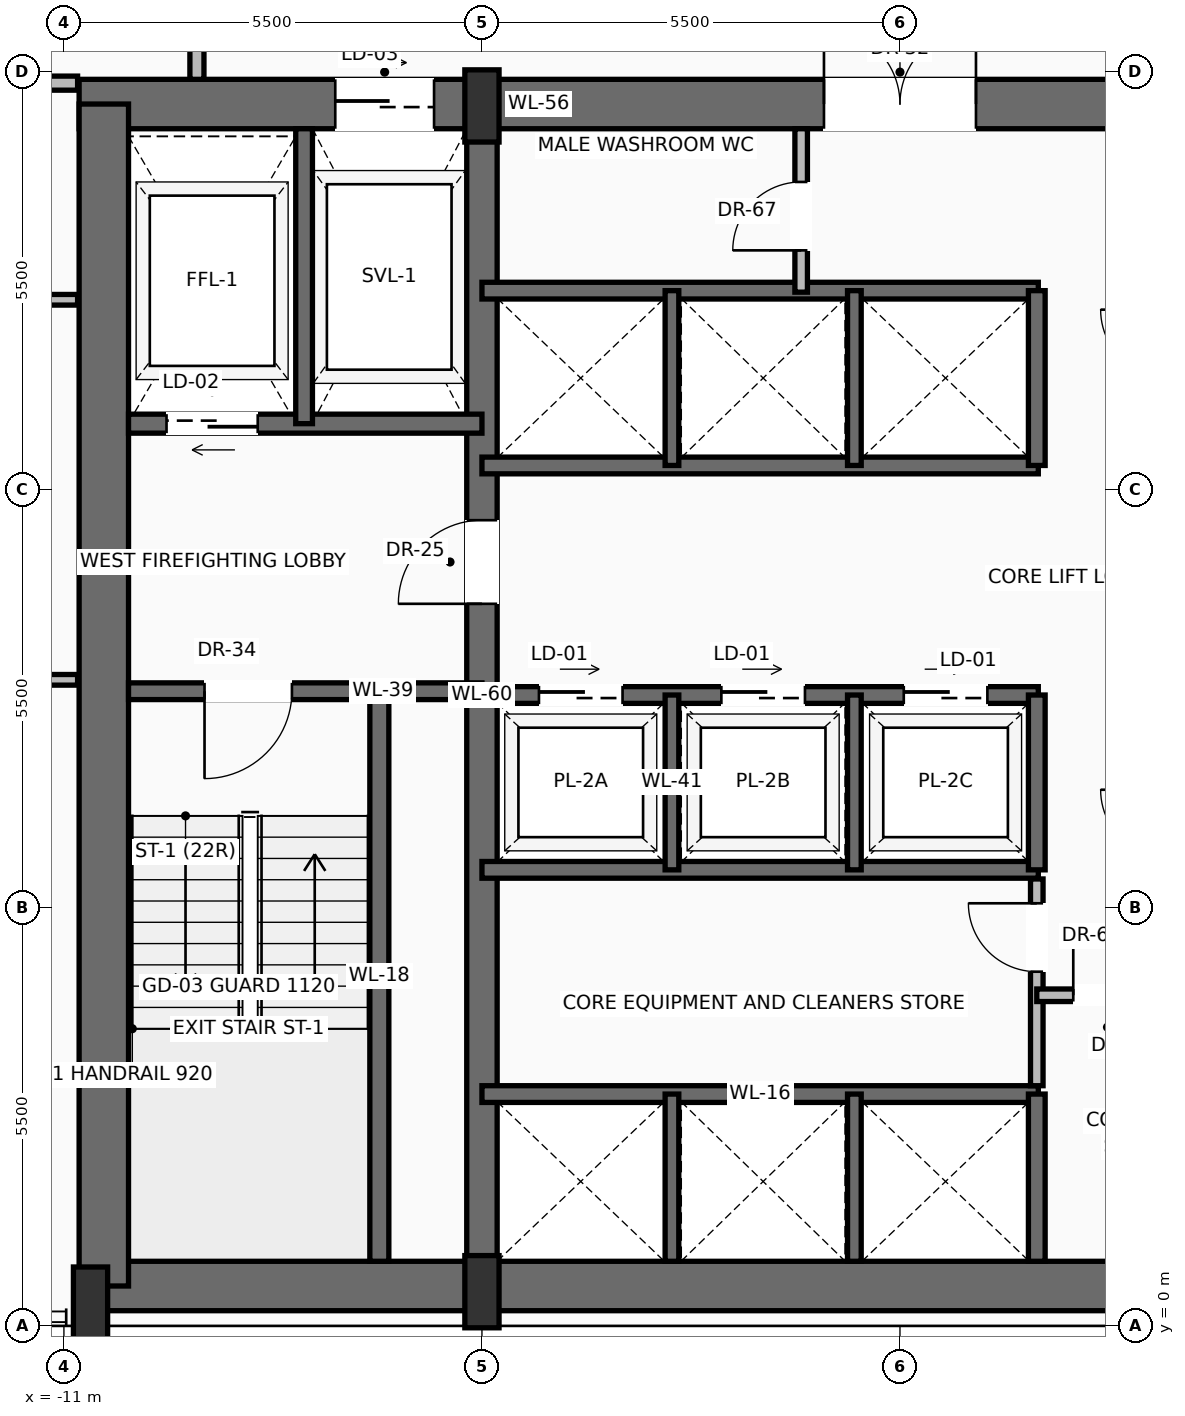
"""IFC4 building model, lengths in metres.
Left out: names, types, materials, properties, quantities, classifications, styles, units other than length and angle.
Written with IfcOpenShell. Run it as: python <this file> out.ifc"""

import sys

from ifc_helpers import new_model, si_unit, direction, frame, frame_2d, origin, origin_2d, place, context, subcontext, project, spatial, rectangle, extrude, source, transform, mapped, element, fill, save


model = new_model("IFC4")
c1 = context("Model", 3, precision=1e-05, world=origin(), true_north=direction((0.0, 1.0)))
c2 = subcontext(c1, "Body", "Model", "MODEL_VIEW")
j1 = project(units=[si_unit("LENGTHUNIT", "METRE"), si_unit("PLANEANGLEUNIT", "RADIAN")], contexts=[c1])
p1 = place(None, origin())
s1 = spatial("IfcSite", under=j1, at=p1, CompositionType="ELEMENT")
p2 = place(p1, origin())
s2 = spatial("IfcBuilding", under=s1, at=p2, CompositionType="ELEMENT")
p3 = place(p2, frame((0.0, 0.0, 125.6)))
s3 = spatial("IfcBuildingStorey", under=s2, at=p3, CompositionType="ELEMENT", Elevation=125.6)
p4 = place(p3, frame((-10.65, 0.525, 0.0), z_axis=(0.0, 0.0, 1.0), x_axis=(1.0, 0.0, 0.0)))
e1 = element("IfcWall", 1, at=p4, inside=s3, PredefinedType="SHEAR", context=c2, shape_type="SweptSolid", body=[
    extrude(rectangle(XDim=21.3, YDim=0.65, at=frame_2d((10.65, 0.0))), origin(), (0.0, 0.0, 1.0), 3.47),
])
p5 = place(p3, frame((-10.8, 16.075, 0.0), z_axis=(0.0, 0.0, 1.0), x_axis=(1.0, 0.0, 0.0)))
e2 = element("IfcWall", 2, at=p5, inside=s3, PredefinedType="SHEAR", context=c2, shape_type="SweptSolid", body=[
    extrude(rectangle(XDim=21.6, YDim=0.65, at=frame_2d((10.8, 0.0))), origin(), (0.0, 0.0, 1.0), 3.47),
])
p6 = place(p5, frame((3.37, 0.0, 0.0)))
e3 = element("IfcOpeningElement", 3, at=p6, cuts=e2, PredefinedType="OPENING", context=c2, shape_type="SweptSolid", body=[
    extrude(rectangle(XDim=1.3, YDim=2.3, at=frame_2d((0.65, 1.15))), frame((0.0, 0.335, 0.0), z_axis=(0.0, -1.0, 0.0), x_axis=(1.0, 0.0, 0.0)), (0.0, 0.0, 1.0), 0.67),
])
p7 = place(p5, frame((9.8, 0.0, 0.0)))
e4 = element("IfcOpeningElement", 4, at=p7, cuts=e2, PredefinedType="OPENING", context=c2, shape_type="SweptSolid", body=[
    extrude(rectangle(XDim=2.0, YDim=2.4, at=frame_2d((1.0, 1.2))), frame((0.0, 0.335, 0.0), z_axis=(0.0, -1.0, 0.0), x_axis=(1.0, 0.0, 0.0)), (0.0, 0.0, 1.0), 0.67),
])
p8 = place(p3, frame((-10.475, 0.525, 0.0), z_axis=(0.0, 0.0, 1.0), x_axis=(0.0, 1.0, 0.0)))
e5 = element("IfcWall", 5, at=p8, inside=s3, PredefinedType="SHEAR", context=c2, shape_type="SweptSolid", body=[
    extrude(rectangle(XDim=15.55, YDim=0.65, at=frame_2d((7.775, 0.0))), origin(), (0.0, 0.0, 1.0), 3.47),
])
p9 = place(p3, frame((-5.5, 0.525, 0.0), z_axis=(0.0, 0.0, 1.0), x_axis=(0.0, 1.0, 0.0)))
e6 = element("IfcWall", 6, at=p9, inside=s3, PredefinedType="SHEAR", context=c2, shape_type="SweptSolid", body=[
    extrude(rectangle(XDim=15.55, YDim=0.4, at=frame_2d((7.775, 0.0))), origin(), (0.0, 0.0, 1.0), 3.47),
])
p10 = place(p9, frame((8.975, 0.0, 0.0)))
e7 = element("IfcOpeningElement", 7, at=p10, cuts=e6, PredefinedType="OPENING", context=c2, shape_type="SweptSolid", body=[
    extrude(rectangle(XDim=1.1, YDim=2.2, at=frame_2d((0.55, 1.1))), frame((0.0, 0.21, 0.0), z_axis=(0.0, -1.0, 0.0), x_axis=(1.0, 0.0, 0.0)), (0.0, 0.0, 1.0), 0.42),
])
m1 = source(origin(), c2, "Body", "SweptSolid", [
    extrude(rectangle(XDim=0.45, YDim=0.95, at=origin_2d()), origin(), (0.0, 0.0, 1.0), 3.7),
])
for number, where, z_axis, x_axis in (
    (8, (-10.65, 0.3, 0.0), (0.0, 0.0, 1.0), (1.0, 0.0, 0.0)),
    (9, (-5.5, 0.45, 0.0), (0.0, 0.0, 1.0), (1.0, 0.0, 0.0)),
    (10, (-5.5, 16.05, 0.0), (0.0, 0.0, 1.0), (1.0, 0.0, 0.0)),
):
    element("IfcColumn", number, at=place(p3, frame(where, z_axis=z_axis, x_axis=x_axis)), inside=s3, PredefinedType="PILASTER", context=c2, shape_type="MappedRepresentation", body=[
        mapped(m1, transform((0.0, 0.0, 0.0), scale=1.0)),
    ])
p11 = place(p3, frame((-6.85, 0.85, 0.0), z_axis=(0.0, 0.0, 1.0), x_axis=(0.0, 1.0, 0.0)))
e11 = element("IfcWall", 11, at=p11, inside=s3, PredefinedType="SOLIDWALL", context=c2, shape_type="SweptSolid", body=[
    extrude(rectangle(XDim=7.5, YDim=0.25, at=frame_2d((3.75, 0.0))), origin(), (0.0, 0.0, 1.0), 3.47),
])
p12 = place(p3, frame((-5.5, 8.35, 0.0), z_axis=(0.0, 0.0, 1.0), x_axis=(-1.0, 0.0, 0.0)))
e12 = element("IfcWall", 12, at=p12, inside=s3, PredefinedType="SOLIDWALL", context=c2, shape_type="SweptSolid", body=[
    extrude(rectangle(XDim=4.65, YDim=0.22, at=frame_2d((2.325, 0.0))), origin(), (0.0, 0.0, 1.0), 3.47),
])
p13 = place(p12, frame((2.5, 0.0, 0.0)))
e13 = element("IfcOpeningElement", 13, at=p13, cuts=e12, PredefinedType="OPENING", context=c2, shape_type="SweptSolid", body=[
    extrude(rectangle(XDim=1.15, YDim=2.2, at=frame_2d((0.575, 1.1))), frame((0.0, 0.12, 0.0), z_axis=(0.0, -1.0, 0.0), x_axis=(1.0, 0.0, 0.0)), (0.0, 0.0, 1.0), 0.24),
])
p14 = place(p3, frame((-5.5, 11.87, 0.0), z_axis=(0.0, 0.0, 1.0), x_axis=(-1.0, 0.0, 0.0)))
e14 = element("IfcWall", 14, at=p14, inside=s3, PredefinedType="SOLIDWALL", context=c2, shape_type="SweptSolid", body=[
    extrude(rectangle(XDim=4.65, YDim=0.25, at=frame_2d((2.325, 0.0))), origin(), (0.0, 0.0, 1.0), 3.47),
])
p15 = place(p14, frame((2.95, 0.0, 0.0)))
e15 = element("IfcOpeningElement", 15, at=p15, cuts=e14, PredefinedType="OPENING", context=c2, shape_type="SweptSolid", body=[
    extrude(rectangle(XDim=1.2, YDim=2.25, at=frame_2d((0.6, 1.125))), frame((0.0, 0.135, 0.0), z_axis=(0.0, -1.0, 0.0), x_axis=(1.0, 0.0, 0.0)), (0.0, 0.0, 1.0), 0.27),
])
p16 = place(p3, frame((-7.84, 11.87, 0.0), z_axis=(0.0, 0.0, 1.0), x_axis=(0.0, 1.0, 0.0)))
e16 = element("IfcWall", 16, at=p16, inside=s3, PredefinedType="SOLIDWALL", context=c2, shape_type="SweptSolid", body=[
    extrude(rectangle(XDim=3.88, YDim=0.22, at=frame_2d((1.94, 0.0))), origin(), (0.0, 0.0, 1.0), 3.47),
])
p17 = place(p3, frame((-5.5, 3.05, 0.0), z_axis=(0.0, 0.0, 1.0), x_axis=(1.0, 0.0, 0.0)))
e17 = element("IfcWall", 17, at=p17, inside=s3, PredefinedType="SOLIDWALL", context=c2, shape_type="SweptSolid", body=[
    extrude(rectangle(XDim=7.32, YDim=0.22, at=frame_2d((3.66, 0.0))), origin(), (0.0, 0.0, 1.0), 3.47),
])
p18 = place(p3, frame((1.8, 0.85, 0.0), z_axis=(0.0, 0.0, 1.0), x_axis=(0.0, 1.0, 0.0)))
e18 = element("IfcWall", 18, at=p18, inside=s3, PredefinedType="SOLIDWALL", context=c2, shape_type="SweptSolid", body=[
    extrude(rectangle(XDim=2.2, YDim=0.22, at=frame_2d((1.1, 0.0))), origin(), (0.0, 0.0, 1.0), 3.47),
])
for number, where, z_axis, x_axis in (
    (19, (-3.0, 0.85, 0.0), (0.0, 0.0, 1.0), (0.0, 1.0, 0.0)),
    (20, (-0.6, 0.85, 0.0), (0.0, 0.0, 1.0), (0.0, 1.0, 0.0)),
):
    element("IfcWall", number, at=place(p3, frame(where, z_axis=z_axis, x_axis=x_axis)), inside=s3, PredefinedType="SOLIDWALL", context=c2, shape_type="SweptSolid", body=[
        extrude(rectangle(XDim=2.2, YDim=0.18, at=frame_2d((1.1, 0.0))), origin(), (0.0, 0.0, 1.0), 3.47),
    ])
p19 = place(p3, frame((1.8, 3.16, 0.0), z_axis=(0.0, 0.0, 1.0), x_axis=(0.0, 1.0, 0.0)))
e21 = element("IfcWall", 21, at=p19, inside=s3, PredefinedType="PARTITIONING", context=c2, shape_type="SweptSolid", body=[
    extrude(rectangle(XDim=2.72, YDim=0.165, at=frame_2d((1.36, 0.0))), origin(), (0.0, 0.0, 1.0), 3.462),
])
p20 = place(p19, frame((1.5, 0.0, 0.0)))
e22 = element("IfcOpeningElement", 22, at=p20, cuts=e21, PredefinedType="OPENING", context=c2, shape_type="SweptSolid", body=[
    extrude(rectangle(XDim=0.9, YDim=2.1, at=frame_2d((0.45, 1.05))), frame((0.0, 0.093, 0.0), z_axis=(0.0, -1.0, 0.0), x_axis=(1.0, 0.0, 0.0)), (0.0, 0.0, 1.0), 0.185),
])
p21 = place(p3, frame((1.8, 4.35, 0.0), z_axis=(0.0, 0.0, 1.0), x_axis=(1.0, 0.0, 0.0)))
e23 = element("IfcWall", 23, at=p21, inside=s3, PredefinedType="PARTITIONING", context=c2, shape_type="SweptSolid", body=[
    extrude(rectangle(XDim=3.62, YDim=0.165, at=frame_2d((1.81, 0.0))), origin(), (0.0, 0.0, 1.0), 3.462),
])
p22 = place(p21, frame((0.48, 0.0, 0.0)))
e24 = element("IfcOpeningElement", 24, at=p22, cuts=e23, PredefinedType="OPENING", context=c2, shape_type="SweptSolid", body=[
    extrude(rectangle(XDim=0.9, YDim=2.1, at=frame_2d((0.45, 1.05))), frame((0.0, 0.093, 0.0), z_axis=(0.0, -1.0, 0.0), x_axis=(1.0, 0.0, 0.0)), (0.0, 0.0, 1.0), 0.185),
])
p23 = place(p3, frame((-5.5, 6.0, 0.0), z_axis=(0.0, 0.0, 1.0), x_axis=(1.0, 0.0, 0.0)))
e25 = element("IfcWall", 25, at=p23, inside=s3, PredefinedType="SOLIDWALL", context=c2, shape_type="SweptSolid", body=[
    extrude(rectangle(XDim=7.32, YDim=0.22, at=frame_2d((3.66, 0.0))), origin(), (0.0, 0.0, 1.0), 3.47),
])
p24 = place(p3, frame((-5.5, 8.3, 0.0), z_axis=(0.0, 0.0, 1.0), x_axis=(1.0, 0.0, 0.0)))
e26 = element("IfcWall", 26, at=p24, inside=s3, PredefinedType="SOLIDWALL", context=c2, shape_type="SweptSolid", body=[
    extrude(rectangle(XDim=7.32, YDim=0.22, at=frame_2d((3.66, 0.0))), origin(), (0.0, 0.0, 1.0), 3.47),
])
p25 = place(p24, frame((0.75, 0.0, 0.0)))
e27 = element("IfcOpeningElement", 27, at=p25, cuts=e26, PredefinedType="OPENING", context=c2, shape_type="SweptSolid", body=[
    extrude(rectangle(XDim=1.1, YDim=2.2, at=frame_2d((0.55, 1.1))), frame((0.0, 0.12, 0.0), z_axis=(0.0, -1.0, 0.0), x_axis=(1.0, 0.0, 0.0)), (0.0, 0.0, 1.0), 0.24),
])
p26 = place(p24, frame((3.15, 0.0, 0.0)))
e28 = element("IfcOpeningElement", 28, at=p26, cuts=e26, PredefinedType="OPENING", context=c2, shape_type="SweptSolid", body=[
    extrude(rectangle(XDim=1.1, YDim=2.2, at=frame_2d((0.55, 1.1))), frame((0.0, 0.12, 0.0), z_axis=(0.0, -1.0, 0.0), x_axis=(1.0, 0.0, 0.0)), (0.0, 0.0, 1.0), 0.24),
])
p27 = place(p24, frame((5.55, 0.0, 0.0)))
e29 = element("IfcOpeningElement", 29, at=p27, cuts=e26, PredefinedType="OPENING", context=c2, shape_type="SweptSolid", body=[
    extrude(rectangle(XDim=1.1, YDim=2.2, at=frame_2d((0.55, 1.1))), frame((0.0, 0.12, 0.0), z_axis=(0.0, -1.0, 0.0), x_axis=(1.0, 0.0, 0.0)), (0.0, 0.0, 1.0), 0.24),
])
p28 = place(p3, frame((1.8, 6.0, 0.0), z_axis=(0.0, 0.0, 1.0), x_axis=(0.0, 1.0, 0.0)))
e30 = element("IfcWall", 30, at=p28, inside=s3, PredefinedType="SOLIDWALL", context=c2, shape_type="SweptSolid", body=[
    extrude(rectangle(XDim=2.3, YDim=0.22, at=frame_2d((1.15, 0.0))), origin(), (0.0, 0.0, 1.0), 3.47),
])
for number, where, z_axis, x_axis in (
    (31, (-3.0, 6.0, 0.0), (0.0, 0.0, 1.0), (0.0, 1.0, 0.0)),
    (32, (-0.6, 6.0, 0.0), (0.0, 0.0, 1.0), (0.0, 1.0, 0.0)),
):
    element("IfcWall", number, at=place(p3, frame(where, z_axis=z_axis, x_axis=x_axis)), inside=s3, PredefinedType="SOLIDWALL", context=c2, shape_type="SweptSolid", body=[
        extrude(rectangle(XDim=2.3, YDim=0.18, at=frame_2d((1.15, 0.0))), origin(), (0.0, 0.0, 1.0), 3.47),
    ])
for number, where, z_axis, x_axis in (
    (33, (-5.5, 11.32, 0.0), (0.0, 0.0, 1.0), (1.0, 0.0, 0.0)),
    (34, (-5.5, 13.62, 0.0), (0.0, 0.0, 1.0), (1.0, 0.0, 0.0)),
):
    element("IfcWall", number, at=place(p3, frame(where, z_axis=z_axis, x_axis=x_axis)), inside=s3, PredefinedType="SOLIDWALL", context=c2, shape_type="SweptSolid", body=[
        extrude(rectangle(XDim=7.32, YDim=0.22, at=frame_2d((3.66, 0.0))), origin(), (0.0, 0.0, 1.0), 3.47),
    ])
p29 = place(p3, frame((1.8, 11.32, 0.0), z_axis=(0.0, 0.0, 1.0), x_axis=(0.0, 1.0, 0.0)))
e35 = element("IfcWall", 35, at=p29, inside=s3, PredefinedType="SOLIDWALL", context=c2, shape_type="SweptSolid", body=[
    extrude(rectangle(XDim=2.3, YDim=0.22, at=frame_2d((1.15, 0.0))), origin(), (0.0, 0.0, 1.0), 3.47),
])
for number, where, z_axis, x_axis in (
    (36, (-3.0, 11.32, 0.0), (0.0, 0.0, 1.0), (0.0, 1.0, 0.0)),
    (37, (-0.6, 11.32, 0.0), (0.0, 0.0, 1.0), (0.0, 1.0, 0.0)),
):
    element("IfcWall", number, at=place(p3, frame(where, z_axis=z_axis, x_axis=x_axis)), inside=s3, PredefinedType="SOLIDWALL", context=c2, shape_type="SweptSolid", body=[
        extrude(rectangle(XDim=2.3, YDim=0.18, at=frame_2d((1.15, 0.0))), origin(), (0.0, 0.0, 1.0), 3.47),
    ])
p30 = place(p3, frame((-1.3, 13.6, 0.0), z_axis=(0.0, 0.0, 1.0), x_axis=(0.0, 1.0, 0.0)))
e38 = element("IfcWall", 38, at=p30, inside=s3, PredefinedType="PARTITIONING", context=c2, shape_type="SweptSolid", body=[
    extrude(rectangle(XDim=2.15, YDim=0.165, at=frame_2d((1.075, 0.0))), origin(), (0.0, 0.0, 1.0), 3.462),
])
p31 = place(p30, frame((0.55, 0.0, 0.0)))
e39 = element("IfcOpeningElement", 39, at=p31, cuts=e38, PredefinedType="OPENING", context=c2, shape_type="SweptSolid", body=[
    extrude(rectangle(XDim=0.9, YDim=2.1, at=frame_2d((0.45, 1.05))), frame((0.0, 0.093, 0.0), z_axis=(0.0, -1.0, 0.0), x_axis=(1.0, 0.0, 0.0)), (0.0, 0.0, 1.0), 0.185),
])
p32 = place(p3, frame((-9.25, 16.4, 0.0), z_axis=(0.0, 0.0, 1.0), x_axis=(0.0, 1.0, 0.0)))
e40 = element("IfcWall", 40, at=p32, inside=s3, PredefinedType="PARTITIONING", context=c2, shape_type="SweptSolid", body=[
    extrude(rectangle(XDim=9.0, YDim=0.185, at=frame_2d((4.5, 0.0))), origin(), (0.0, 0.0, 1.0), 2.846),
])
p33 = place(p32, frame((3.609, 0.0, 0.0)))
e41 = element("IfcOpeningElement", 41, at=p33, cuts=e40, PredefinedType="OPENING", context=c2, shape_type="SweptSolid", body=[
    extrude(rectangle(XDim=0.95, YDim=2.2, at=frame_2d((0.475, 1.1))), frame((0.0, 0.103, 0.0), z_axis=(0.0, -1.0, 0.0), x_axis=(1.0, 0.0, 0.0)), (0.0, 0.0, 1.0), 0.205),
])
p34 = place(p32, frame((6.368, 0.0, 0.0)))
e42 = element("IfcOpeningElement", 42, at=p34, cuts=e40, PredefinedType="OPENING", context=c2, shape_type="SweptSolid", body=[
    extrude(rectangle(XDim=0.95, YDim=2.2, at=frame_2d((0.475, 1.1))), frame((0.0, 0.103, 0.0), z_axis=(0.0, -1.0, 0.0), x_axis=(1.0, 0.0, 0.0)), (0.0, 0.0, 1.0), 0.205),
])
p35 = place(p3, frame((-22.083, 16.35, 0.0), z_axis=(0.0, 0.0, 1.0), x_axis=(1.0, 0.0, 0.0)))
e43 = element("IfcWall", 43, at=p35, inside=s3, PredefinedType="PARTITIONING", context=c2, shape_type="SweptSolid", body=[
    extrude(rectangle(XDim=11.263, YDim=0.185, at=frame_2d((5.631, 0.0))), origin(), (0.0, 0.0, 1.0), 3.462),
])
p36 = place(p35, frame((6.744, 0.0, 0.0)))
e44 = element("IfcOpeningElement", 44, at=p36, cuts=e43, PredefinedType="OPENING", context=c2, shape_type="SweptSolid", body=[
    extrude(rectangle(XDim=0.95, YDim=2.2, at=frame_2d((0.475, 1.1))), frame((0.0, 0.103, 0.0), z_axis=(0.0, -1.0, 0.0), x_axis=(1.0, 0.0, 0.0)), (0.0, 0.0, 1.0), 0.205),
])
p37 = place(p3, frame((-27.258, 8.5, 0.0), z_axis=(0.0, 0.0, 1.0), x_axis=(1.0, 0.0, 0.0)))
e45 = element("IfcWall", 45, at=p37, inside=s3, PredefinedType="PARTITIONING", context=c2, shape_type="SweptSolid", body=[
    extrude(rectangle(XDim=16.438, YDim=0.14, at=frame_2d((8.219, 0.0))), origin(), (0.0, 0.0, 1.0), 3.462),
])
p38 = place(p37, frame((7.754, 0.0, 0.0)))
e46 = element("IfcOpeningElement", 46, at=p38, cuts=e45, PredefinedType="OPENING", context=c2, shape_type="SweptSolid", body=[
    extrude(rectangle(XDim=0.95, YDim=2.2, at=frame_2d((0.475, 1.1))), frame((0.0, 0.08, 0.0), z_axis=(0.0, -1.0, 0.0), x_axis=(1.0, 0.0, 0.0)), (0.0, 0.0, 1.0), 0.16),
])
p39 = place(p3, frame((-23.962, 13.5, 0.0), z_axis=(0.0, 0.0, 1.0), x_axis=(1.0, 0.0, 0.0)))
e47 = element("IfcWall", 47, at=p39, inside=s3, PredefinedType="PARTITIONING", context=c2, shape_type="SweptSolid", body=[
    extrude(rectangle(XDim=13.142, YDim=0.14, at=frame_2d((6.571, 0.0))), origin(), (0.0, 0.0, 1.0), 3.049),
])
p40 = place(p39, frame((6.106, 0.0, 0.0)))
e48 = element("IfcOpeningElement", 48, at=p40, cuts=e47, PredefinedType="OPENING", context=c2, shape_type="SweptSolid", body=[
    extrude(rectangle(XDim=0.95, YDim=2.2, at=frame_2d((0.475, 1.1))), frame((0.0, 0.08, 0.0), z_axis=(0.0, -1.0, 0.0), x_axis=(1.0, 0.0, 0.0)), (0.0, 0.0, 1.0), 0.16),
])
m2 = source(origin(), c2, "Body", "SweptSolid", [
    extrude(rectangle(XDim=1.15, YDim=2.2, at=frame_2d((0.575, 1.1))), frame((0.0, 0.025, 0.0), z_axis=(0.0, -1.0, 0.0), x_axis=(1.0, 0.0, 0.0)), (0.0, 0.0, 1.0), 0.05),
])
p41 = place(p13, origin())
e49 = element("IfcDoor", 49, at=p41, inside=s3, OperationType="SINGLE_SWING_RIGHT", PredefinedType="DOOR", context=c2, shape_type="MappedRepresentation", body=[
    mapped(m2, transform((0.0, 0.0, 0.0), scale=1.0)),
])
fill(e13, e49)
m3 = source(origin(), c2, "Body", "SweptSolid", [
    extrude(rectangle(XDim=1.1, YDim=2.2, at=frame_2d((0.55, 1.1))), frame((0.0, 0.025, 0.0), z_axis=(0.0, -1.0, 0.0), x_axis=(1.0, 0.0, 0.0)), (0.0, 0.0, 1.0), 0.05),
])
p42 = place(p10, origin())
e50 = element("IfcDoor", 50, at=p42, inside=s3, OperationType="SINGLE_SWING_LEFT", PredefinedType="DOOR", context=c2, shape_type="MappedRepresentation", body=[
    mapped(m3, transform((0.0, 0.0, 0.0), scale=1.0)),
])
fill(e7, e50)
m4 = source(origin(), c2, "Body", "SweptSolid", [
    extrude(rectangle(XDim=1.2, YDim=2.25, at=frame_2d((0.6, 1.125))), frame((0.0, 0.025, 0.0), z_axis=(0.0, -1.0, 0.0), x_axis=(1.0, 0.0, 0.0)), (0.0, 0.0, 1.0), 0.05),
])
p43 = place(p15, origin())
e51 = element("IfcDoor", 51, at=p43, inside=s3, OperationType="SLIDING_TO_LEFT", PredefinedType="DOOR", context=c2, shape_type="MappedRepresentation", body=[
    mapped(m4, transform((0.0, 0.0, 0.0), scale=1.0)),
])
fill(e15, e51)
m5 = source(origin(), c2, "Body", "SweptSolid", [
    extrude(rectangle(XDim=1.3, YDim=2.3, at=frame_2d((0.65, 1.15))), frame((0.0, 0.025, 0.0), z_axis=(0.0, -1.0, 0.0), x_axis=(1.0, 0.0, 0.0)), (0.0, 0.0, 1.0), 0.05),
])
p44 = place(p6, origin())
e52 = element("IfcDoor", 52, at=p44, inside=s3, OperationType="SLIDING_TO_RIGHT", PredefinedType="DOOR", context=c2, shape_type="MappedRepresentation", body=[
    mapped(m5, transform((0.0, 0.0, 0.0), scale=1.0)),
])
fill(e3, e52)
m6 = source(origin(), c2, "Body", "SweptSolid", [
    extrude(rectangle(XDim=2.0, YDim=2.4, at=frame_2d((1.0, 1.2))), frame((0.0, 0.025, 0.0), z_axis=(0.0, -1.0, 0.0), x_axis=(1.0, 0.0, 0.0)), (0.0, 0.0, 1.0), 0.05),
])
p45 = place(p7, origin())
e53 = element("IfcDoor", 53, at=p45, inside=s3, OperationType="DOUBLE_DOOR_SINGLE_SWING", PredefinedType="DOOR", context=c2, shape_type="MappedRepresentation", body=[
    mapped(m6, transform((0.0, 0.0, 0.0), scale=1.0)),
])
fill(e4, e53)
m7 = source(origin(), c2, "Body", "SweptSolid", [
    extrude(rectangle(XDim=0.9, YDim=2.1, at=frame_2d((0.45, 1.05))), frame((0.0, 0.025, 0.0), z_axis=(0.0, -1.0, 0.0), x_axis=(1.0, 0.0, 0.0)), (0.0, 0.0, 1.0), 0.05),
])
p46 = place(p20, origin())
e54 = element("IfcDoor", 54, at=p46, inside=s3, OperationType="SINGLE_SWING_RIGHT", PredefinedType="DOOR", context=c2, shape_type="MappedRepresentation", body=[
    mapped(m7, transform((0.0, 0.0, 0.0), scale=1.0)),
])
fill(e22, e54)
p47 = place(p22, origin())
e55 = element("IfcDoor", 55, at=p47, inside=s3, OperationType="SINGLE_SWING_LEFT", PredefinedType="DOOR", context=c2, shape_type="MappedRepresentation", body=[
    mapped(m7, transform((0.0, 0.0, 0.0), scale=1.0)),
])
fill(e24, e55)
m8 = source(origin(), c2, "Body", "SweptSolid", [
    extrude(rectangle(XDim=1.1, YDim=2.2, at=frame_2d((0.55, 1.1))), frame((0.0, 0.025, 0.0), z_axis=(0.0, -1.0, 0.0), x_axis=(1.0, 0.0, 0.0)), (0.0, 0.0, 1.0), 0.05),
])
p48 = place(p25, origin())
e56 = element("IfcDoor", 56, at=p48, inside=s3, OperationType="SLIDING_TO_LEFT", PredefinedType="DOOR", context=c2, shape_type="MappedRepresentation", body=[
    mapped(m8, transform((0.0, 0.0, 0.0), scale=1.0)),
])
fill(e27, e56)
p49 = place(p26, origin())
e57 = element("IfcDoor", 57, at=p49, inside=s3, OperationType="SLIDING_TO_LEFT", PredefinedType="DOOR", context=c2, shape_type="MappedRepresentation", body=[
    mapped(m8, transform((0.0, 0.0, 0.0), scale=1.0)),
])
fill(e28, e57)
p50 = place(p27, origin())
e58 = element("IfcDoor", 58, at=p50, inside=s3, OperationType="SLIDING_TO_LEFT", PredefinedType="DOOR", context=c2, shape_type="MappedRepresentation", body=[
    mapped(m8, transform((0.0, 0.0, 0.0), scale=1.0)),
])
fill(e29, e58)
p51 = place(p31, origin())
e59 = element("IfcDoor", 59, at=p51, inside=s3, OperationType="SINGLE_SWING_LEFT", PredefinedType="DOOR", context=c2, shape_type="MappedRepresentation", body=[
    mapped(m7, transform((0.0, 0.0, 0.0), scale=1.0)),
])
fill(e39, e59)
save(model, sys.argv[1])
